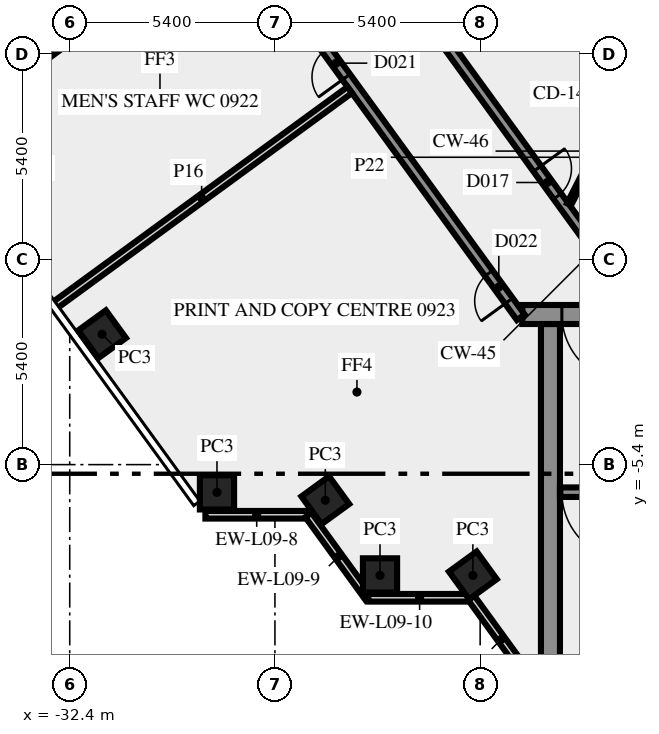
"""IFC4 building model, lengths in metres.
Left out: names, types, materials, properties, quantities, classifications, styles, units other than length and angle.
Written with IfcOpenShell. Run it as: python <this file> out.ifc"""

import sys

from ifc_helpers import new_model, si_unit, direction, frame, frame_2d, origin, origin_2d, place, context, subcontext, project, spatial, rectangle, extrude, element, fill, save


model = new_model("IFC4")
c1 = context("Model", 3, precision=1e-05, world=origin(), true_north=direction((0.0, 1.0)))
c2 = subcontext(c1, "Body", "Model", "MODEL_VIEW")
j1 = project(units=[si_unit("LENGTHUNIT", "METRE"), si_unit("PLANEANGLEUNIT", "RADIAN")], contexts=[c1])
p1 = place(None, origin())
s1 = spatial("IfcSite", under=j1, at=p1, CompositionType="ELEMENT")
p2 = place(p1, origin())
s2 = spatial("IfcBuilding", under=s1, at=p2, CompositionType="ELEMENT")
p3 = place(p2, frame((0.0, 0.0, 43.0)))
s3 = spatial("IfcBuildingStorey", under=s2, at=p3, CompositionType="ELEMENT", Elevation=43.0)
for number, where, z_axis, x_axis in (
    (1, (-31.548, -1.969, 0.0), (0.0, 0.0, 1.0), (0.588, -0.809, 0.0)),
    (2, (-28.525, -6.13, 0.0), (0.0, 0.0, 1.0), (1.0, 0.0, 0.0)),
    (3, (-25.674, -6.337, 0.0), (0.0, 0.0, 1.0), (0.588, -0.809, 0.0)),
    (4, (-24.235, -8.315, 0.0), (0.0, 0.0, 1.0), (1.0, 0.0, 0.0)),
    (5, (-21.792, -8.315, 0.0), (0.0, 0.0, 1.0), (0.588, -0.809, 0.0)),
):
    element("IfcColumn", number, at=place(p3, frame(where, z_axis=z_axis, x_axis=x_axis)), inside=s3, PredefinedType="COLUMN", context=c2, shape_type="SweptSolid", body=[
        extrude(rectangle(XDim=0.9, YDim=0.9, at=origin_2d()), origin(), (0.0, 0.0, 1.0), 3.65),
    ])
p4 = place(p3, frame((-28.83, -6.719, 0.0), z_axis=(0.0, 0.0, 1.0), x_axis=(1.0, 0.0, 0.0)))
e6 = element("IfcWall", 6, at=p4, inside=s3, PredefinedType="SOLIDWALL", context=c2, shape_type="SweptSolid", body=[
    extrude(rectangle(XDim=2.7, YDim=0.2, at=frame_2d((1.35, 0.0))), origin(), (0.0, 0.0, 1.0), 3.65),
])
p5 = place(p3, frame((-26.12, -6.724, 0.0), z_axis=(0.0, 0.0, 1.0), x_axis=(0.587720002413, -0.809064397168, 0.0)))
e7 = element("IfcWall", 7, at=p5, inside=s3, PredefinedType="SOLIDWALL", context=c2, shape_type="SweptSolid", body=[
    extrude(rectangle(XDim=2.7, YDim=0.2, at=frame_2d((1.35, 0.0))), origin(), (0.0, 0.0, 1.0), 3.65),
])
p6 = place(p3, frame((-24.543, -8.904, 0.0), z_axis=(0.0, 0.0, 1.0), x_axis=(1.0, 0.0, 0.0)))
e8 = element("IfcWall", 8, at=p6, inside=s3, PredefinedType="SOLIDWALL", context=c2, shape_type="SweptSolid", body=[
    extrude(rectangle(XDim=2.7, YDim=0.2, at=frame_2d((1.35, 0.0))), origin(), (0.0, 0.0, 1.0), 3.65),
])
p7 = place(p3, frame((-21.833, -8.909, 0.0), z_axis=(0.0, 0.0, 1.0), x_axis=(0.587766567315, -0.809030569476, 0.0)))
e9 = element("IfcWall", 9, at=p7, inside=s3, PredefinedType="SOLIDWALL", context=c2, shape_type="SweptSolid", body=[
    extrude(rectangle(XDim=2.688, YDim=0.2, at=frame_2d((1.344, 0.0))), origin(), (0.0, 0.0, 1.0), 3.65),
])
p8 = place(p3, frame((-19.75, -10.5, 0.0), z_axis=(0.0, 0.0, 1.0), x_axis=(0.0, 1.0, 0.0)))
e10 = element("IfcWall", 10, at=p8, inside=s3, PredefinedType="SHEAR", context=c2, shape_type="SweptSolid", body=[
    extrude(rectangle(XDim=8.8, YDim=0.5, at=frame_2d((4.4, 0.0))), origin(), (0.0, 0.0, 1.0), 3.65),
])
p9 = place(p3, frame((-11.45, -6.125, 0.0), z_axis=(0.0, 0.0, 1.0), x_axis=(-1.0, 0.0, 0.0)))
e11 = element("IfcWall", 11, at=p9, inside=s3, PredefinedType="SHEAR", context=c2, shape_type="SweptSolid", body=[
    extrude(rectangle(XDim=8.05, YDim=0.25, at=frame_2d((4.025, 0.0))), origin(), (0.0, 0.0, 1.0), 3.65),
])
p10 = place(p9, frame((6.2, 0.0, 0.0)))
e12 = element("IfcOpeningElement", 12, at=p10, cuts=e11, PredefinedType="OPENING", context=c2, shape_type="SweptSolid", body=[
    extrude(rectangle(XDim=1.8, YDim=2.1, at=frame_2d((0.9, 1.05))), frame((0.0, 0.135, 0.0), z_axis=(0.0, -1.0, 0.0), x_axis=(1.0, 0.0, 0.0)), (0.0, 0.0, 1.0), 0.27),
])
p11 = place(p3, frame((20.49, -1.45, 0.0), z_axis=(0.0, 0.0, 1.0), x_axis=(-1.0, 0.0, 0.0)))
e13 = element("IfcWall", 13, at=p11, inside=s3, PredefinedType="SHEAR", context=c2, shape_type="SweptSolid", body=[
    extrude(rectangle(XDim=40.98, YDim=0.5, at=frame_2d((20.49, 0.0))), origin(), (0.0, 0.0, 1.0), 3.65),
])
p12 = place(p11, frame((38.14, 0.0, 0.0)))
e14 = element("IfcOpeningElement", 14, at=p12, cuts=e13, PredefinedType="OPENING", context=c2, shape_type="SweptSolid", body=[
    extrude(rectangle(XDim=1.8, YDim=2.1, at=frame_2d((0.9, 1.05))), frame((0.0, 0.26, 0.0), z_axis=(0.0, -1.0, 0.0), x_axis=(1.0, 0.0, 0.0)), (0.0, 0.0, 1.0), 0.52),
])
p13 = place(p11, frame((35.89, 0.0, 0.0)))
e15 = element("IfcOpeningElement", 15, at=p13, cuts=e13, PredefinedType="OPENING", context=c2, shape_type="SweptSolid", body=[
    extrude(rectangle(XDim=0.9, YDim=2.1, at=frame_2d((0.45, 1.05))), frame((0.0, 0.26, 0.0), z_axis=(0.0, -1.0, 0.0), x_axis=(1.0, 0.0, 0.0)), (0.0, 0.0, 1.0), 0.52),
])
p14 = place(p11, frame((32.94, 0.0, 0.0)))
e16 = element("IfcOpeningElement", 16, at=p14, cuts=e13, PredefinedType="OPENING", context=c2, shape_type="SweptSolid", body=[
    extrude(rectangle(XDim=0.9, YDim=2.1, at=frame_2d((0.45, 1.05))), frame((0.0, 0.26, 0.0), z_axis=(0.0, -1.0, 0.0), x_axis=(1.0, 0.0, 0.0)), (0.0, 0.0, 1.0), 0.52),
])
p15 = place(p11, frame((19.59, 0.0, 0.0)))
e17 = element("IfcOpeningElement", 17, at=p15, cuts=e13, PredefinedType="OPENING", context=c2, shape_type="SweptSolid", body=[
    extrude(rectangle(XDim=2.0, YDim=2.1, at=frame_2d((1.0, 1.05))), frame((0.0, 0.26, 0.0), z_axis=(0.0, -1.0, 0.0), x_axis=(1.0, 0.0, 0.0)), (0.0, 0.0, 1.0), 0.52),
])
p16 = place(p11, frame((7.14, 0.0, 0.0)))
e18 = element("IfcOpeningElement", 18, at=p16, cuts=e13, PredefinedType="OPENING", context=c2, shape_type="SweptSolid", body=[
    extrude(rectangle(XDim=0.9, YDim=2.1, at=frame_2d((0.45, 1.05))), frame((0.0, 0.26, 0.0), z_axis=(0.0, -1.0, 0.0), x_axis=(1.0, 0.0, 0.0)), (0.0, 0.0, 1.0), 0.52),
])
p17 = place(p11, frame((5.028, 0.0, 0.0)))
e19 = element("IfcOpeningElement", 19, at=p17, cuts=e13, PredefinedType="OPENING", context=c2, shape_type="SweptSolid", body=[
    extrude(rectangle(XDim=0.8, YDim=2.1, at=frame_2d((0.4, 1.05))), frame((0.0, 0.26, 0.0), z_axis=(0.0, -1.0, 0.0), x_axis=(1.0, 0.0, 0.0)), (0.0, 0.0, 1.0), 0.52),
])
p18 = place(p11, frame((3.452, 0.0, 0.0)))
e20 = element("IfcOpeningElement", 20, at=p18, cuts=e13, PredefinedType="OPENING", context=c2, shape_type="SweptSolid", body=[
    extrude(rectangle(XDim=0.8, YDim=2.1, at=frame_2d((0.4, 1.05))), frame((0.0, 0.26, 0.0), z_axis=(0.0, -1.0, 0.0), x_axis=(1.0, 0.0, 0.0)), (0.0, 0.0, 1.0), 0.52),
])
p19 = place(p11, frame((1.04, 0.0, 0.0)))
e21 = element("IfcOpeningElement", 21, at=p19, cuts=e13, PredefinedType="OPENING", context=c2, shape_type="SweptSolid", body=[
    extrude(rectangle(XDim=1.8, YDim=2.1, at=frame_2d((0.9, 1.05))), frame((0.0, 0.26, 0.0), z_axis=(0.0, -1.0, 0.0), x_axis=(1.0, 0.0, 0.0)), (0.0, 0.0, 1.0), 0.52),
])
p20 = place(p3, frame((-20.531, -1.523, 0.0), z_axis=(0.0, 0.0, 1.0), x_axis=(-0.587784593204, 0.809017473231, 0.0)))
e22 = element("IfcWall", 22, at=p20, inside=s3, PredefinedType="SOLIDWALL", context=c2, shape_type="SweptSolid", body=[
    extrude(rectangle(XDim=44.67, YDim=0.25, at=frame_2d((22.335, 0.0))), origin(), (0.0, 0.0, 1.0), 3.65),
])
p21 = place(p20, frame((26.14, 0.0, 0.0)))
e23 = element("IfcOpeningElement", 23, at=p21, cuts=e22, PredefinedType="OPENING", context=c2, shape_type="SweptSolid", body=[
    extrude(rectangle(XDim=1.8, YDim=2.1, at=frame_2d((0.9, 1.05))), frame((0.0, 0.135, 0.0), z_axis=(0.0, -1.0, 0.0), x_axis=(1.0, 0.0, 0.0)), (0.0, 0.0, 1.0), 0.27),
])
p22 = place(p20, frame((43.296, 0.0, 0.0)))
e24 = element("IfcOpeningElement", 24, at=p22, cuts=e22, PredefinedType="OPENING", context=c2, shape_type="SweptSolid", body=[
    extrude(rectangle(XDim=0.9, YDim=2.1, at=frame_2d((0.45, 1.05))), frame((0.0, 0.135, 0.0), z_axis=(0.0, -1.0, 0.0), x_axis=(1.0, 0.0, 0.0)), (0.0, 0.0, 1.0), 0.27),
])
p23 = place(p20, frame((13.216, 0.0, 0.0)))
e25 = element("IfcOpeningElement", 25, at=p23, cuts=e22, PredefinedType="OPENING", context=c2, shape_type="SweptSolid", body=[
    extrude(rectangle(XDim=0.9, YDim=2.1, at=frame_2d((0.45, 1.05))), frame((0.0, 0.135, 0.0), z_axis=(0.0, -1.0, 0.0), x_axis=(1.0, 0.0, 0.0)), (0.0, 0.0, 1.0), 0.27),
])
p24 = place(p20, frame((7.816, 0.0, 0.0)))
e26 = element("IfcOpeningElement", 26, at=p24, cuts=e22, PredefinedType="OPENING", context=c2, shape_type="SweptSolid", body=[
    extrude(rectangle(XDim=0.9, YDim=2.1, at=frame_2d((0.45, 1.05))), frame((0.0, 0.135, 0.0), z_axis=(0.0, -1.0, 0.0), x_axis=(1.0, 0.0, 0.0)), (0.0, 0.0, 1.0), 0.27),
])
p25 = place(p20, frame((0.533, 0.0, 0.0)))
e27 = element("IfcOpeningElement", 27, at=p25, cuts=e22, PredefinedType="OPENING", context=c2, shape_type="SweptSolid", body=[
    extrude(rectangle(XDim=0.9, YDim=2.1, at=frame_2d((0.45, 1.05))), frame((0.0, 0.135, 0.0), z_axis=(0.0, -1.0, 0.0), x_axis=(1.0, 0.0, 0.0)), (0.0, 0.0, 1.0), 0.27),
])
p26 = place(p3, frame((-37.232, 25.972, 0.0), z_axis=(0.0, 0.0, 1.0), x_axis=(0.587786323093, -0.809016216391, 0.0)))
e28 = element("IfcWall", 28, at=p26, inside=s3, PredefinedType="SOLIDWALL", context=c2, shape_type="SweptSolid", body=[
    extrude(rectangle(XDim=33.493, YDim=0.25, at=frame_2d((16.747, 0.0))), origin(), (0.0, 0.0, 1.0), 3.65),
])
p27 = place(p26, frame((2.935, 0.0, 0.0)))
e29 = element("IfcOpeningElement", 29, at=p27, cuts=e28, PredefinedType="OPENING", context=c2, shape_type="SweptSolid", body=[
    extrude(rectangle(XDim=0.9, YDim=2.1, at=frame_2d((0.45, 1.05))), frame((0.0, 0.135, 0.0), z_axis=(0.0, -1.0, 0.0), x_axis=(1.0, 0.0, 0.0)), (0.0, 0.0, 1.0), 0.27),
])
p28 = place(p26, frame((16.435, 0.0, 0.0)))
e30 = element("IfcOpeningElement", 30, at=p28, cuts=e28, PredefinedType="OPENING", context=c2, shape_type="SweptSolid", body=[
    extrude(rectangle(XDim=0.9, YDim=2.1, at=frame_2d((0.45, 1.05))), frame((0.0, 0.135, 0.0), z_axis=(0.0, -1.0, 0.0), x_axis=(1.0, 0.0, 0.0)), (0.0, 0.0, 1.0), 0.27),
])
p29 = place(p26, frame((29.152, 0.0, 0.0)))
e31 = element("IfcOpeningElement", 31, at=p29, cuts=e28, PredefinedType="OPENING", context=c2, shape_type="SweptSolid", body=[
    extrude(rectangle(XDim=0.9, YDim=2.1, at=frame_2d((0.45, 1.05))), frame((0.0, 0.135, 0.0), z_axis=(0.0, -1.0, 0.0), x_axis=(1.0, 0.0, 0.0)), (0.0, 0.0, 1.0), 0.27),
])
p30 = place(p26, frame((14.536, 0.0, 0.0)))
e32 = element("IfcOpeningElement", 32, at=p30, cuts=e28, PredefinedType="OPENING", context=c2, shape_type="SweptSolid", body=[
    extrude(rectangle(XDim=1.2, YDim=2.1, at=frame_2d((0.6, 1.05))), frame((0.0, 0.135, 0.0), z_axis=(0.0, -1.0, 0.0), x_axis=(1.0, 0.0, 0.0)), (0.0, 0.0, 1.0), 0.27),
])
p31 = place(p26, frame((1.335, 0.0, 0.0)))
e33 = element("IfcOpeningElement", 33, at=p31, cuts=e28, PredefinedType="OPENING", context=c2, shape_type="SweptSolid", body=[
    extrude(rectangle(XDim=0.9, YDim=2.1, at=frame_2d((0.45, 1.05))), frame((0.0, 0.135, 0.0), z_axis=(0.0, -1.0, 0.0), x_axis=(1.0, 0.0, 0.0)), (0.0, 0.0, 1.0), 0.27),
])
p32 = place(p3, frame((-35.919, 3.197, 0.0), z_axis=(0.0, 0.0, 1.0), x_axis=(0.807645841498, 0.589667868135, 0.0)))
e34 = element("IfcWall", 34, at=p32, inside=s3, PredefinedType="PARTITIONING", context=c2, shape_type="SweptSolid", body=[
    extrude(rectangle(XDim=9.551, YDim=0.12, at=frame_2d((4.775, 0.0))), origin(), (0.0, 0.0, 1.0), 2.75),
])
p33 = place(p3, frame((-32.826, -1.232, 0.0), z_axis=(0.0, 0.0, 1.0), x_axis=(0.807602415854, 0.589727342004, 0.0)))
e35 = element("IfcWall", 35, at=p33, inside=s3, PredefinedType="SOLIDWALL", context=c2, shape_type="SweptSolid", body=[
    extrude(rectangle(XDim=9.651, YDim=0.2, at=frame_2d((4.826, 0.0))), origin(), (0.0, 0.0, 1.0), 2.75),
])
p34 = place(p3, frame((-19.261, 1.45, 0.0), z_axis=(0.0, 0.0, 1.0), x_axis=(0.453950796792, 0.891026752736, 0.0)))
e36 = element("IfcWall", 36, at=p34, inside=s3, PredefinedType="PARTITIONING", context=c2, shape_type="SweptSolid", body=[
    extrude(rectangle(XDim=2.778, YDim=0.12, at=frame_2d((1.389, 0.0))), origin(), (0.0, 0.0, 1.0), 3.65),
])
p35 = place(p10, origin())
e37 = element("IfcDoor", 37, at=p35, inside=s3, OperationType="DOUBLE_DOOR_SINGLE_SWING", PredefinedType="DOOR", context=c2, shape_type="SweptSolid", body=[
    extrude(rectangle(XDim=1.8, YDim=2.1, at=frame_2d((0.9, 1.05))), frame((0.0, 0.025, 0.0), z_axis=(0.0, -1.0, 0.0), x_axis=(1.0, 0.0, 0.0)), (0.0, 0.0, 1.0), 0.05),
])
fill(e12, e37)
p36 = place(p12, origin())
e38 = element("IfcDoor", 38, at=p36, inside=s3, OperationType="DOUBLE_DOOR_SINGLE_SWING", PredefinedType="DOOR", context=c2, shape_type="SweptSolid", body=[
    extrude(rectangle(XDim=1.8, YDim=2.1, at=frame_2d((0.9, 1.05))), frame((0.0, 0.025, 0.0), z_axis=(0.0, -1.0, 0.0), x_axis=(1.0, 0.0, 0.0)), (0.0, 0.0, 1.0), 0.05),
])
fill(e14, e38)
p37 = place(p24, origin())
e39 = element("IfcDoor", 39, at=p37, inside=s3, OperationType="SINGLE_SWING_LEFT", PredefinedType="DOOR", context=c2, shape_type="SweptSolid", body=[
    extrude(rectangle(XDim=0.9, YDim=2.1, at=frame_2d((0.45, 1.05))), frame((0.0, 0.025, 0.0), z_axis=(0.0, -1.0, 0.0), x_axis=(1.0, 0.0, 0.0)), (0.0, 0.0, 1.0), 0.05),
])
fill(e26, e39)
p38 = place(p29, origin())
e40 = element("IfcDoor", 40, at=p38, inside=s3, OperationType="SINGLE_SWING_RIGHT", PredefinedType="DOOR", context=c2, shape_type="SweptSolid", body=[
    extrude(rectangle(XDim=0.9, YDim=2.1, at=frame_2d((0.45, 1.05))), frame((0.0, 0.025, 0.0), z_axis=(0.0, -1.0, 0.0), x_axis=(1.0, 0.0, 0.0)), (0.0, 0.0, 1.0), 0.05),
])
fill(e31, e40)
p39 = place(p25, origin())
e41 = element("IfcDoor", 41, at=p39, inside=s3, OperationType="SINGLE_SWING_LEFT", PredefinedType="DOOR", context=c2, shape_type="SweptSolid", body=[
    extrude(rectangle(XDim=0.9, YDim=2.1, at=frame_2d((0.45, 1.05))), frame((0.0, 0.025, 0.0), z_axis=(0.0, -1.0, 0.0), x_axis=(1.0, 0.0, 0.0)), (0.0, 0.0, 1.0), 0.05),
])
fill(e27, e41)
save(model, sys.argv[1])
